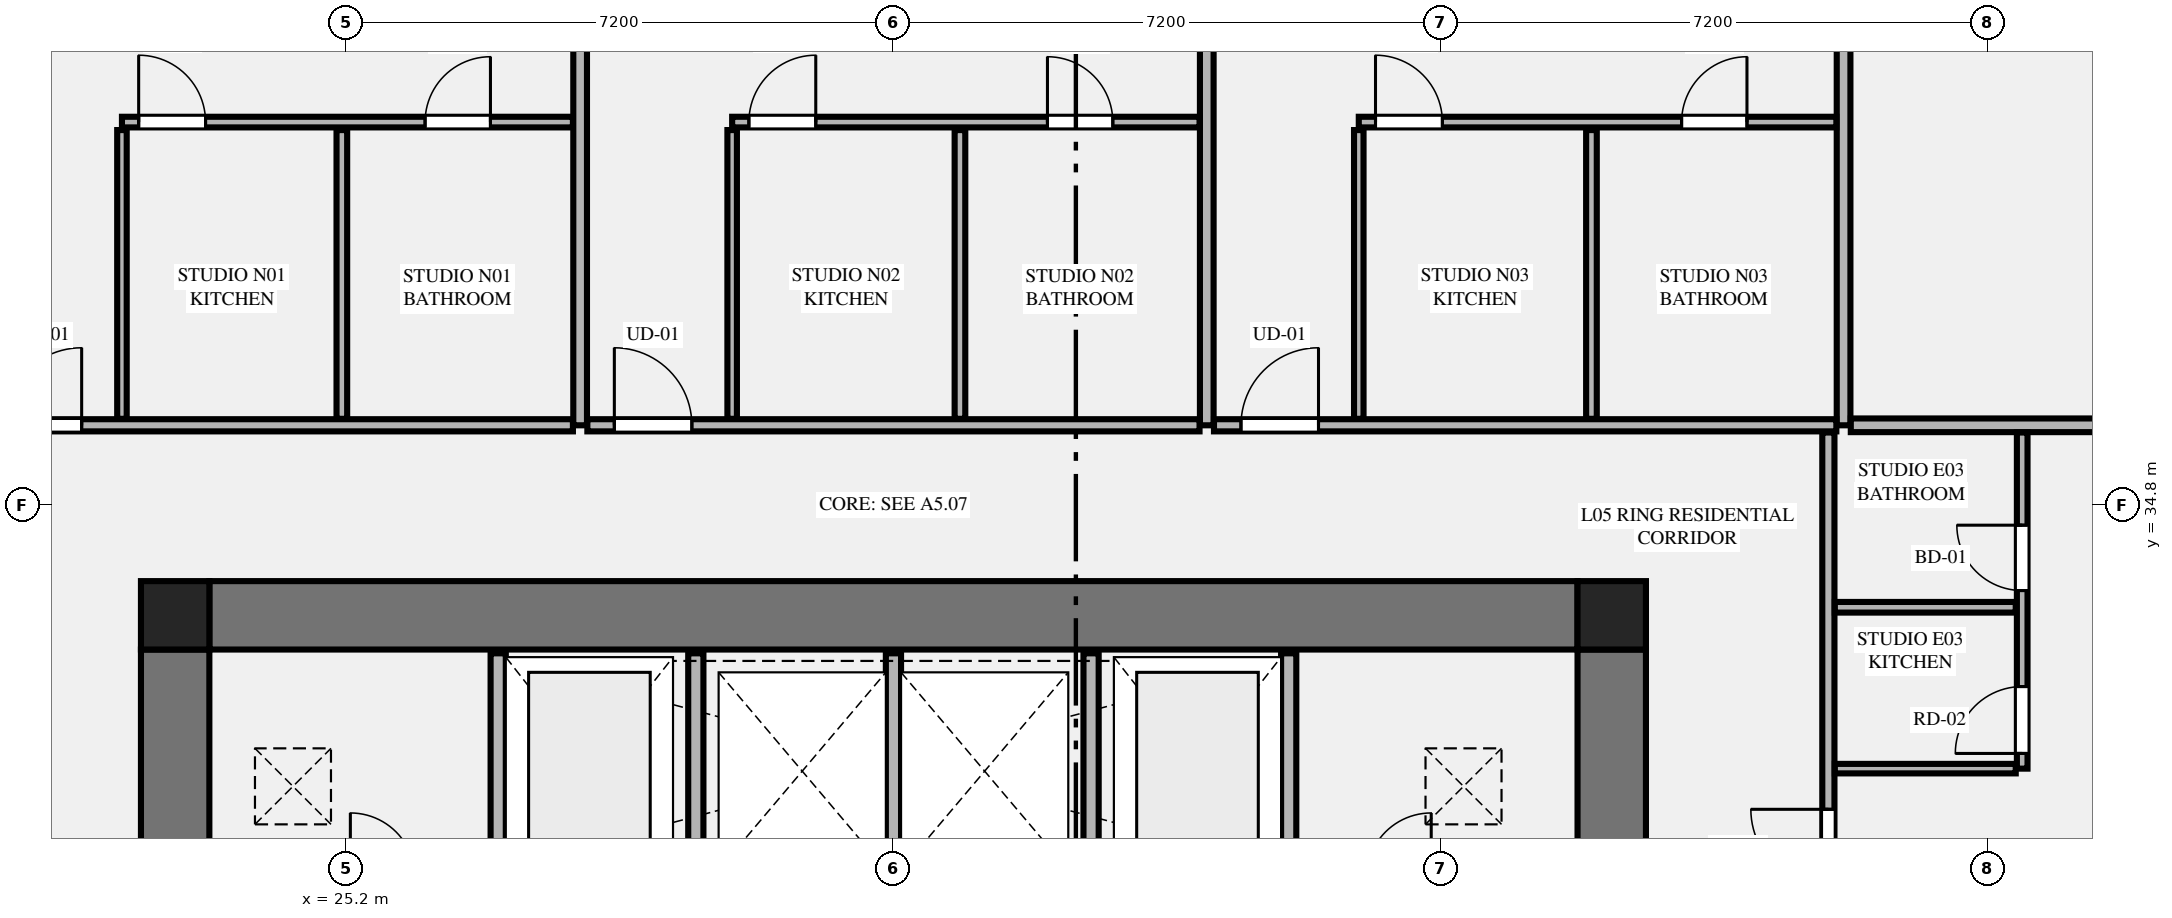
"""IFC4 building model, lengths in metres.
Left out: names, types, materials, properties, quantities, classifications, styles, units other than length and angle.
Written with IfcOpenShell. Run it as: python <this file> out.ifc"""

import sys

from ifc_helpers import new_model, si_unit, direction, frame, frame_2d, origin, origin_2d, place, context, subcontext, project, spatial, rectangle, extrude, element, fill, save


model = new_model("IFC4")
c1 = context("Model", 3, precision=1e-05, world=origin(), true_north=direction((0.0, 1.0)))
c2 = subcontext(c1, "Body", "Model", "MODEL_VIEW")
j1 = project(units=[si_unit("LENGTHUNIT", "METRE"), si_unit("PLANEANGLEUNIT", "RADIAN")], contexts=[c1])
p1 = place(None, origin())
s1 = spatial("IfcSite", under=j1, at=p1, CompositionType="ELEMENT")
p2 = place(p1, origin())
s2 = spatial("IfcBuilding", under=s1, at=p2, CompositionType="ELEMENT")
p3 = place(p2, frame((0.0, 0.0, 24.9)))
s3 = spatial("IfcBuildingStorey", under=s2, at=p3, CompositionType="ELEMENT", Elevation=24.9)
for number, where, z_axis, x_axis in (
    (1, (41.85, 33.35, 0.0), (0.0, 0.0, 1.0), (1.0, 0.0, 0.0)),
    (2, (22.95, 33.35, 0.0), (0.0, 0.0, 1.0), (1.0, 0.0, 0.0)),
):
    element("IfcColumn", number, at=place(p3, frame(where, z_axis=z_axis, x_axis=x_axis)), inside=s3, PredefinedType="COLUMN", context=c2, shape_type="SweptSolid", body=[
        extrude(rectangle(XDim=0.9, YDim=0.9, at=origin_2d()), origin(), (0.0, 0.0, 1.0), 3.55),
    ])
p4 = place(p3, frame((23.4, 33.35, 0.0), z_axis=(0.0, 0.0, 1.0), x_axis=(1.0, 0.0, 0.0)))
e3 = element("IfcWall", 3, at=p4, inside=s3, PredefinedType="SHEAR", context=c2, shape_type="SweptSolid", body=[
    extrude(rectangle(XDim=18.0, YDim=0.9, at=frame_2d((9.0, 0.0))), origin(), (0.0, 0.0, 1.0), 3.33),
])
p5 = place(p3, frame((22.95, 18.9, 0.0), z_axis=(0.0, 0.0, 1.0), x_axis=(0.0, 1.0, 0.0)))
e4 = element("IfcWall", 4, at=p5, inside=s3, PredefinedType="SHEAR", context=c2, shape_type="SweptSolid", body=[
    extrude(rectangle(XDim=14.0, YDim=0.9, at=frame_2d((7.0, 0.0))), origin(), (0.0, 0.0, 1.0), 3.33),
])
p6 = place(p5, frame((2.94, 0.0, 0.0)))
e5 = element("IfcOpeningElement", 5, at=p6, cuts=e4, PredefinedType="OPENING", context=c2, shape_type="SweptSolid", body=[
    extrude(rectangle(XDim=1.22, YDim=2.25, at=frame_2d((0.61, 1.125))), frame((0.0, 0.46, 0.0), z_axis=(0.0, -1.0, 0.0), x_axis=(1.0, 0.0, 0.0)), (0.0, 0.0, 1.0), 0.92),
])
p7 = place(p3, frame((41.85, 18.9, 0.0), z_axis=(0.0, 0.0, 1.0), x_axis=(0.0, 1.0, 0.0)))
e6 = element("IfcWall", 6, at=p7, inside=s3, PredefinedType="SHEAR", context=c2, shape_type="SweptSolid", body=[
    extrude(rectangle(XDim=14.0, YDim=0.9, at=frame_2d((7.0, 0.0))), origin(), (0.0, 0.0, 1.0), 3.33),
])
p8 = place(p7, frame((2.94, 0.0, 0.0)))
e7 = element("IfcOpeningElement", 7, at=p8, cuts=e6, PredefinedType="OPENING", context=c2, shape_type="SweptSolid", body=[
    extrude(rectangle(XDim=1.22, YDim=2.25, at=frame_2d((0.61, 1.125))), frame((0.0, 0.46, 0.0), z_axis=(0.0, -1.0, 0.0), x_axis=(1.0, 0.0, 0.0)), (0.0, 0.0, 1.0), 0.92),
])
for number, where, z_axis, x_axis in (
    (8, (27.2, 30.0, 0.0), (0.0, 0.0, 1.0), (0.0, 1.0, 0.0)),
    (9, (29.8, 30.0, 0.0), (0.0, 0.0, 1.0), (0.0, 1.0, 0.0)),
    (10, (32.4, 30.0, 0.0), (0.0, 0.0, 1.0), (0.0, 1.0, 0.0)),
    (11, (35.0, 30.0, 0.0), (0.0, 0.0, 1.0), (0.0, 1.0, 0.0)),
    (12, (37.6, 30.0, 0.0), (0.0, 0.0, 1.0), (0.0, 1.0, 0.0)),
):
    element("IfcWall", number, at=place(p3, frame(where, z_axis=z_axis, x_axis=x_axis)), inside=s3, PredefinedType="PLUMBINGWALL", context=c2, shape_type="SweptSolid", body=[
        extrude(rectangle(XDim=2.85, YDim=0.2, at=frame_2d((1.425, 0.0))), origin(), (0.0, 0.0, 1.0), 3.33),
    ])
for number, where, z_axis, x_axis in (
    (13, (28.278, 35.85, 0.0), (0.0, 0.0, 1.0), (0.0, 1.0, 0.0)),
    (14, (36.522, 35.85, 0.0), (0.0, 0.0, 1.0), (0.0, 1.0, 0.0)),
):
    element("IfcWall", number, at=place(p3, frame(where, z_axis=z_axis, x_axis=x_axis)), inside=s3, PredefinedType="PARTITIONING", context=c2, shape_type="SweptSolid", body=[
        extrude(rectangle(XDim=13.295, YDim=0.18, at=frame_2d((6.647, 0.0))), origin(), (0.0, 0.0, 1.0), 2.637),
    ])
p9 = place(p3, frame((44.9, 35.85, 0.0), z_axis=(0.0, 0.0, 1.0), x_axis=(0.0, 1.0, 0.0)))
e15 = element("IfcWall", 15, at=p9, inside=s3, PredefinedType="PARTITIONING", context=c2, shape_type="SweptSolid", body=[
    extrude(rectangle(XDim=13.295, YDim=0.18, at=frame_2d((6.647, 0.0))), origin(), (0.0, 0.0, 1.0), 3.33),
])
p10 = place(p3, frame((19.995, 35.85, 0.0), z_axis=(0.0, 0.0, 1.0), x_axis=(1.0, 0.0, 0.0)))
e16 = element("IfcWall", 16, at=p10, inside=s3, PredefinedType="PARTITIONING", context=c2, shape_type="SweptSolid", body=[
    extrude(rectangle(XDim=8.188, YDim=0.16, at=frame_2d((4.094, 0.0))), origin(), (0.0, 0.0, 1.0), 3.33),
])
p11 = place(p10, frame((0.705, 0.0, 0.0)))
e17 = element("IfcOpeningElement", 17, at=p11, cuts=e16, PredefinedType="OPENING", context=c2, shape_type="SweptSolid", body=[
    extrude(rectangle(XDim=1.02, YDim=2.25, at=frame_2d((0.51, 1.125))), frame((0.0, 0.09, 0.0), z_axis=(0.0, -1.0, 0.0), x_axis=(1.0, 0.0, 0.0)), (0.0, 0.0, 1.0), 0.18),
])
p12 = place(p3, frame((22.25, 35.935, 0.0), z_axis=(0.0, 0.0, 1.0), x_axis=(0.0, 1.0, 0.0)))
e18 = element("IfcWall", 18, at=p12, inside=s3, PredefinedType="PARTITIONING", context=c2, shape_type="SweptSolid", body=[
    extrude(rectangle(XDim=3.799, YDim=0.125, at=frame_2d((1.899, 0.0))), origin(), (0.0, 0.0, 1.0), 2.637),
])
p13 = place(p3, frame((22.25, 39.839, 0.0), z_axis=(0.0, 0.0, 1.0), x_axis=(1.0, 0.0, 0.0)))
e19 = element("IfcWall", 19, at=p13, inside=s3, PredefinedType="PLUMBINGWALL", context=c2, shape_type="SweptSolid", body=[
    extrude(rectangle(XDim=5.933, YDim=0.14, at=frame_2d((2.967, 0.0))), origin(), (0.0, 0.0, 1.0), 3.33),
])
p14 = place(p13, frame((3.988, 0.0, 0.0)))
e20 = element("IfcOpeningElement", 20, at=p14, cuts=e19, PredefinedType="OPENING", context=c2, shape_type="SweptSolid", body=[
    extrude(rectangle(XDim=0.86, YDim=2.1, at=frame_2d((0.43, 1.05))), frame((0.0, 0.08, 0.0), z_axis=(0.0, -1.0, 0.0), x_axis=(1.0, 0.0, 0.0)), (0.0, 0.0, 1.0), 0.16),
])
p15 = place(p13, frame((0.22, 0.0, 0.0)))
e21 = element("IfcOpeningElement", 21, at=p15, cuts=e19, PredefinedType="OPENING", context=c2, shape_type="SweptSolid", body=[
    extrude(rectangle(XDim=0.88, YDim=2.15, at=frame_2d((0.44, 1.075))), frame((0.0, 0.08, 0.0), z_axis=(0.0, -1.0, 0.0), x_axis=(1.0, 0.0, 0.0)), (0.0, 0.0, 1.0), 0.16),
])
p16 = place(p3, frame((25.143, 35.935, 0.0), z_axis=(0.0, 0.0, 1.0), x_axis=(0.0, 1.0, 0.0)))
e22 = element("IfcWall", 22, at=p16, inside=s3, PredefinedType="PLUMBINGWALL", context=c2, shape_type="SweptSolid", body=[
    extrude(rectangle(XDim=3.799, YDim=0.14, at=frame_2d((1.899, 0.0))), origin(), (0.0, 0.0, 1.0), 3.33),
])
p17 = place(p3, frame((28.373, 35.85, 0.0), z_axis=(0.0, 0.0, 1.0), x_axis=(1.0, 0.0, 0.0)))
e23 = element("IfcWall", 23, at=p17, inside=s3, PredefinedType="PARTITIONING", context=c2, shape_type="SweptSolid", body=[
    extrude(rectangle(XDim=8.054, YDim=0.16, at=frame_2d((4.027, 0.0))), origin(), (0.0, 0.0, 1.0), 3.33),
])
p18 = place(p17, frame((0.355, 0.0, 0.0)))
e24 = element("IfcOpeningElement", 24, at=p18, cuts=e23, PredefinedType="OPENING", context=c2, shape_type="SweptSolid", body=[
    extrude(rectangle(XDim=1.02, YDim=2.25, at=frame_2d((0.51, 1.125))), frame((0.0, 0.09, 0.0), z_axis=(0.0, -1.0, 0.0), x_axis=(1.0, 0.0, 0.0)), (0.0, 0.0, 1.0), 0.18),
])
p19 = place(p3, frame((30.278, 35.935, 0.0), z_axis=(0.0, 0.0, 1.0), x_axis=(0.0, 1.0, 0.0)))
e25 = element("IfcWall", 25, at=p19, inside=s3, PredefinedType="PARTITIONING", context=c2, shape_type="SweptSolid", body=[
    extrude(rectangle(XDim=3.799, YDim=0.125, at=frame_2d((1.899, 0.0))), origin(), (0.0, 0.0, 1.0), 3.33),
])
p20 = place(p3, frame((30.278, 39.839, 0.0), z_axis=(0.0, 0.0, 1.0), x_axis=(1.0, 0.0, 0.0)))
e26 = element("IfcWall", 26, at=p20, inside=s3, PredefinedType="PLUMBINGWALL", context=c2, shape_type="SweptSolid", body=[
    extrude(rectangle(XDim=6.149, YDim=0.14, at=frame_2d((3.074, 0.0))), origin(), (0.0, 0.0, 1.0), 3.33),
])
p21 = place(p20, frame((4.148, 0.0, 0.0)))
e27 = element("IfcOpeningElement", 27, at=p21, cuts=e26, PredefinedType="OPENING", context=c2, shape_type="SweptSolid", body=[
    extrude(rectangle(XDim=0.86, YDim=2.1, at=frame_2d((0.43, 1.05))), frame((0.0, 0.08, 0.0), z_axis=(0.0, -1.0, 0.0), x_axis=(1.0, 0.0, 0.0)), (0.0, 0.0, 1.0), 0.16),
])
p22 = place(p20, frame((0.22, 0.0, 0.0)))
e28 = element("IfcOpeningElement", 28, at=p22, cuts=e26, PredefinedType="OPENING", context=c2, shape_type="SweptSolid", body=[
    extrude(rectangle(XDim=0.88, YDim=2.15, at=frame_2d((0.44, 1.075))), frame((0.0, 0.08, 0.0), z_axis=(0.0, -1.0, 0.0), x_axis=(1.0, 0.0, 0.0)), (0.0, 0.0, 1.0), 0.16),
])
p23 = place(p3, frame((33.275, 35.935, 0.0), z_axis=(0.0, 0.0, 1.0), x_axis=(0.0, 1.0, 0.0)))
e29 = element("IfcWall", 29, at=p23, inside=s3, PredefinedType="PLUMBINGWALL", context=c2, shape_type="SweptSolid", body=[
    extrude(rectangle(XDim=3.799, YDim=0.14, at=frame_2d((1.899, 0.0))), origin(), (0.0, 0.0, 1.0), 3.33),
])
p24 = place(p3, frame((36.617, 35.85, 0.0), z_axis=(0.0, 0.0, 1.0), x_axis=(1.0, 0.0, 0.0)))
e30 = element("IfcWall", 30, at=p24, inside=s3, PredefinedType="PARTITIONING", context=c2, shape_type="SweptSolid", body=[
    extrude(rectangle(XDim=8.188, YDim=0.16, at=frame_2d((4.094, 0.0))), origin(), (0.0, 0.0, 1.0), 3.33),
])
p25 = place(p24, frame((0.355, 0.0, 0.0)))
e31 = element("IfcOpeningElement", 31, at=p25, cuts=e30, PredefinedType="OPENING", context=c2, shape_type="SweptSolid", body=[
    extrude(rectangle(XDim=1.02, YDim=2.25, at=frame_2d((0.51, 1.125))), frame((0.0, 0.09, 0.0), z_axis=(0.0, -1.0, 0.0), x_axis=(1.0, 0.0, 0.0)), (0.0, 0.0, 1.0), 0.18),
])
p26 = place(p3, frame((38.522, 35.935, 0.0), z_axis=(0.0, 0.0, 1.0), x_axis=(0.0, 1.0, 0.0)))
e32 = element("IfcWall", 32, at=p26, inside=s3, PredefinedType="PARTITIONING", context=c2, shape_type="SweptSolid", body=[
    extrude(rectangle(XDim=3.799, YDim=0.125, at=frame_2d((1.899, 0.0))), origin(), (0.0, 0.0, 1.0), 3.33),
])
p27 = place(p3, frame((38.522, 39.839, 0.0), z_axis=(0.0, 0.0, 1.0), x_axis=(1.0, 0.0, 0.0)))
e33 = element("IfcWall", 33, at=p27, inside=s3, PredefinedType="PLUMBINGWALL", context=c2, shape_type="SweptSolid", body=[
    extrude(rectangle(XDim=6.283, YDim=0.14, at=frame_2d((3.142, 0.0))), origin(), (0.0, 0.0, 1.0), 3.33),
])
p28 = place(p27, frame((4.247, 0.0, 0.0)))
e34 = element("IfcOpeningElement", 34, at=p28, cuts=e33, PredefinedType="OPENING", context=c2, shape_type="SweptSolid", body=[
    extrude(rectangle(XDim=0.86, YDim=2.1, at=frame_2d((0.43, 1.05))), frame((0.0, 0.08, 0.0), z_axis=(0.0, -1.0, 0.0), x_axis=(1.0, 0.0, 0.0)), (0.0, 0.0, 1.0), 0.16),
])
p29 = place(p27, frame((0.22, 0.0, 0.0)))
e35 = element("IfcOpeningElement", 35, at=p29, cuts=e33, PredefinedType="OPENING", context=c2, shape_type="SweptSolid", body=[
    extrude(rectangle(XDim=0.88, YDim=2.15, at=frame_2d((0.44, 1.075))), frame((0.0, 0.08, 0.0), z_axis=(0.0, -1.0, 0.0), x_axis=(1.0, 0.0, 0.0)), (0.0, 0.0, 1.0), 0.16),
])
p30 = place(p3, frame((41.583, 35.935, 0.0), z_axis=(0.0, 0.0, 1.0), x_axis=(0.0, 1.0, 0.0)))
e36 = element("IfcWall", 36, at=p30, inside=s3, PredefinedType="PLUMBINGWALL", context=c2, shape_type="SweptSolid", body=[
    extrude(rectangle(XDim=3.799, YDim=0.14, at=frame_2d((1.899, 0.0))), origin(), (0.0, 0.0, 1.0), 3.33),
])
p31 = place(p3, frame((44.995, 35.85, 0.0), z_axis=(0.0, 0.0, 1.0), x_axis=(1.0, 0.0, 0.0)))
e37 = element("IfcWall", 37, at=p31, inside=s3, PredefinedType="PARTITIONING", context=c2, shape_type="SweptSolid", body=[
    extrude(rectangle(XDim=9.14, YDim=0.18, at=frame_2d((4.57, 0.0))), origin(), (0.0, 0.0, 1.0), 3.33),
])
p32 = place(p3, frame((44.7, 29.378, 0.0), z_axis=(0.0, 0.0, 1.0), x_axis=(0.0, 1.0, 0.0)))
e38 = element("IfcWall", 38, at=p32, inside=s3, PredefinedType="PARTITIONING", context=c2, shape_type="SweptSolid", body=[
    extrude(rectangle(XDim=6.377, YDim=0.16, at=frame_2d((3.188, 0.0))), origin(), (0.0, 0.0, 1.0), 3.33),
])
p33 = place(p32, frame((0.4, 0.0, 0.0)))
e39 = element("IfcOpeningElement", 39, at=p33, cuts=e38, PredefinedType="OPENING", context=c2, shape_type="SweptSolid", body=[
    extrude(rectangle(XDim=1.02, YDim=2.25, at=frame_2d((0.51, 1.125))), frame((0.0, 0.09, 0.0), z_axis=(0.0, -1.0, 0.0), x_axis=(1.0, 0.0, 0.0)), (0.0, 0.0, 1.0), 0.18),
])
p34 = place(p3, frame((44.785, 31.333, 0.0), z_axis=(0.0, 0.0, 1.0), x_axis=(1.0, 0.0, 0.0)))
e40 = element("IfcWall", 40, at=p34, inside=s3, PredefinedType="PARTITIONING", context=c2, shape_type="SweptSolid", body=[
    extrude(rectangle(XDim=2.38, YDim=0.125, at=frame_2d((1.19, 0.0))), origin(), (0.0, 0.0, 1.0), 3.33),
])
p35 = place(p3, frame((47.25, 31.333, 0.0), z_axis=(0.0, 0.0, 1.0), x_axis=(0.0, 1.0, 0.0)))
e41 = element("IfcWall", 41, at=p35, inside=s3, PredefinedType="PLUMBINGWALL", context=c2, shape_type="SweptSolid", body=[
    extrude(rectangle(XDim=4.422, YDim=0.14, at=frame_2d((2.211, 0.0))), origin(), (0.0, 0.0, 1.0), 3.33),
])
p36 = place(p35, frame((2.343, 0.0, 0.0)))
e42 = element("IfcOpeningElement", 42, at=p36, cuts=e41, PredefinedType="OPENING", context=c2, shape_type="SweptSolid", body=[
    extrude(rectangle(XDim=0.86, YDim=2.1, at=frame_2d((0.43, 1.05))), frame((0.0, 0.08, 0.0), z_axis=(0.0, -1.0, 0.0), x_axis=(1.0, 0.0, 0.0)), (0.0, 0.0, 1.0), 0.16),
])
p37 = place(p35, frame((0.2, 0.0, 0.0)))
e43 = element("IfcOpeningElement", 43, at=p37, cuts=e41, PredefinedType="OPENING", context=c2, shape_type="SweptSolid", body=[
    extrude(rectangle(XDim=0.88, YDim=2.15, at=frame_2d((0.44, 1.075))), frame((0.0, 0.08, 0.0), z_axis=(0.0, -1.0, 0.0), x_axis=(1.0, 0.0, 0.0)), (0.0, 0.0, 1.0), 0.16),
])
p38 = place(p3, frame((44.785, 33.456, 0.0), z_axis=(0.0, 0.0, 1.0), x_axis=(1.0, 0.0, 0.0)))
e44 = element("IfcWall", 44, at=p38, inside=s3, PredefinedType="PLUMBINGWALL", context=c2, shape_type="SweptSolid", body=[
    extrude(rectangle(XDim=2.38, YDim=0.14, at=frame_2d((1.19, 0.0))), origin(), (0.0, 0.0, 1.0), 2.637),
])
p39 = place(p14, origin())
e45 = element("IfcDoor", 45, at=p39, inside=s3, OperationType="SINGLE_SWING_RIGHT", PredefinedType="DOOR", context=c2, shape_type="SweptSolid", body=[
    extrude(rectangle(XDim=0.86, YDim=2.1, at=frame_2d((0.43, 1.05))), frame((0.0, 0.025, 0.0), z_axis=(0.0, -1.0, 0.0), x_axis=(1.0, 0.0, 0.0)), (0.0, 0.0, 1.0), 0.05),
])
fill(e20, e45)
p40 = place(p11, origin())
e46 = element("IfcDoor", 46, at=p40, inside=s3, OperationType="SINGLE_SWING_RIGHT", PredefinedType="DOOR", context=c2, shape_type="SweptSolid", body=[
    extrude(rectangle(XDim=1.02, YDim=2.25, at=frame_2d((0.51, 1.125))), frame((0.0, 0.025, 0.0), z_axis=(0.0, -1.0, 0.0), x_axis=(1.0, 0.0, 0.0)), (0.0, 0.0, 1.0), 0.05),
])
fill(e17, e46)
p41 = place(p15, origin())
e47 = element("IfcDoor", 47, at=p41, inside=s3, OperationType="SINGLE_SWING_LEFT", PredefinedType="DOOR", context=c2, shape_type="SweptSolid", body=[
    extrude(rectangle(XDim=0.88, YDim=2.15, at=frame_2d((0.44, 1.075))), frame((0.0, 0.025, 0.0), z_axis=(0.0, -1.0, 0.0), x_axis=(1.0, 0.0, 0.0)), (0.0, 0.0, 1.0), 0.05),
])
fill(e21, e47)
p42 = place(p21, origin())
e48 = element("IfcDoor", 48, at=p42, inside=s3, OperationType="SINGLE_SWING_LEFT", PredefinedType="DOOR", context=c2, shape_type="SweptSolid", body=[
    extrude(rectangle(XDim=0.86, YDim=2.1, at=frame_2d((0.43, 1.05))), frame((0.0, 0.025, 0.0), z_axis=(0.0, -1.0, 0.0), x_axis=(1.0, 0.0, 0.0)), (0.0, 0.0, 1.0), 0.05),
])
fill(e27, e48)
p43 = place(p18, origin())
e49 = element("IfcDoor", 49, at=p43, inside=s3, OperationType="SINGLE_SWING_LEFT", PredefinedType="DOOR", context=c2, shape_type="SweptSolid", body=[
    extrude(rectangle(XDim=1.02, YDim=2.25, at=frame_2d((0.51, 1.125))), frame((0.0, 0.025, 0.0), z_axis=(0.0, -1.0, 0.0), x_axis=(1.0, 0.0, 0.0)), (0.0, 0.0, 1.0), 0.05),
])
fill(e24, e49)
p44 = place(p22, origin())
e50 = element("IfcDoor", 50, at=p44, inside=s3, OperationType="SINGLE_SWING_RIGHT", PredefinedType="DOOR", context=c2, shape_type="SweptSolid", body=[
    extrude(rectangle(XDim=0.88, YDim=2.15, at=frame_2d((0.44, 1.075))), frame((0.0, 0.025, 0.0), z_axis=(0.0, -1.0, 0.0), x_axis=(1.0, 0.0, 0.0)), (0.0, 0.0, 1.0), 0.05),
])
fill(e28, e50)
p45 = place(p28, origin())
e51 = element("IfcDoor", 51, at=p45, inside=s3, OperationType="SINGLE_SWING_RIGHT", PredefinedType="DOOR", context=c2, shape_type="SweptSolid", body=[
    extrude(rectangle(XDim=0.86, YDim=2.1, at=frame_2d((0.43, 1.05))), frame((0.0, 0.025, 0.0), z_axis=(0.0, -1.0, 0.0), x_axis=(1.0, 0.0, 0.0)), (0.0, 0.0, 1.0), 0.05),
])
fill(e34, e51)
p46 = place(p25, origin())
e52 = element("IfcDoor", 52, at=p46, inside=s3, OperationType="SINGLE_SWING_RIGHT", PredefinedType="DOOR", context=c2, shape_type="SweptSolid", body=[
    extrude(rectangle(XDim=1.02, YDim=2.25, at=frame_2d((0.51, 1.125))), frame((0.0, 0.025, 0.0), z_axis=(0.0, -1.0, 0.0), x_axis=(1.0, 0.0, 0.0)), (0.0, 0.0, 1.0), 0.05),
])
fill(e31, e52)
p47 = place(p29, origin())
e53 = element("IfcDoor", 53, at=p47, inside=s3, OperationType="SINGLE_SWING_LEFT", PredefinedType="DOOR", context=c2, shape_type="SweptSolid", body=[
    extrude(rectangle(XDim=0.88, YDim=2.15, at=frame_2d((0.44, 1.075))), frame((0.0, 0.025, 0.0), z_axis=(0.0, -1.0, 0.0), x_axis=(1.0, 0.0, 0.0)), (0.0, 0.0, 1.0), 0.05),
])
fill(e35, e53)
p48 = place(p36, origin())
e54 = element("IfcDoor", 54, at=p48, inside=s3, OperationType="SINGLE_SWING_RIGHT", PredefinedType="DOOR", context=c2, shape_type="SweptSolid", body=[
    extrude(rectangle(XDim=0.86, YDim=2.1, at=frame_2d((0.43, 1.05))), frame((0.0, 0.025, 0.0), z_axis=(0.0, -1.0, 0.0), x_axis=(1.0, 0.0, 0.0)), (0.0, 0.0, 1.0), 0.05),
])
fill(e42, e54)
p49 = place(p33, origin())
e55 = element("IfcDoor", 55, at=p49, inside=s3, OperationType="SINGLE_SWING_RIGHT", PredefinedType="DOOR", context=c2, shape_type="SweptSolid", body=[
    extrude(rectangle(XDim=1.02, YDim=2.25, at=frame_2d((0.51, 1.125))), frame((0.0, 0.025, 0.0), z_axis=(0.0, -1.0, 0.0), x_axis=(1.0, 0.0, 0.0)), (0.0, 0.0, 1.0), 0.05),
])
fill(e39, e55)
p50 = place(p37, origin())
e56 = element("IfcDoor", 56, at=p50, inside=s3, OperationType="SINGLE_SWING_LEFT", PredefinedType="DOOR", context=c2, shape_type="SweptSolid", body=[
    extrude(rectangle(XDim=0.88, YDim=2.15, at=frame_2d((0.44, 1.075))), frame((0.0, 0.025, 0.0), z_axis=(0.0, -1.0, 0.0), x_axis=(1.0, 0.0, 0.0)), (0.0, 0.0, 1.0), 0.05),
])
fill(e43, e56)
save(model, sys.argv[1])
